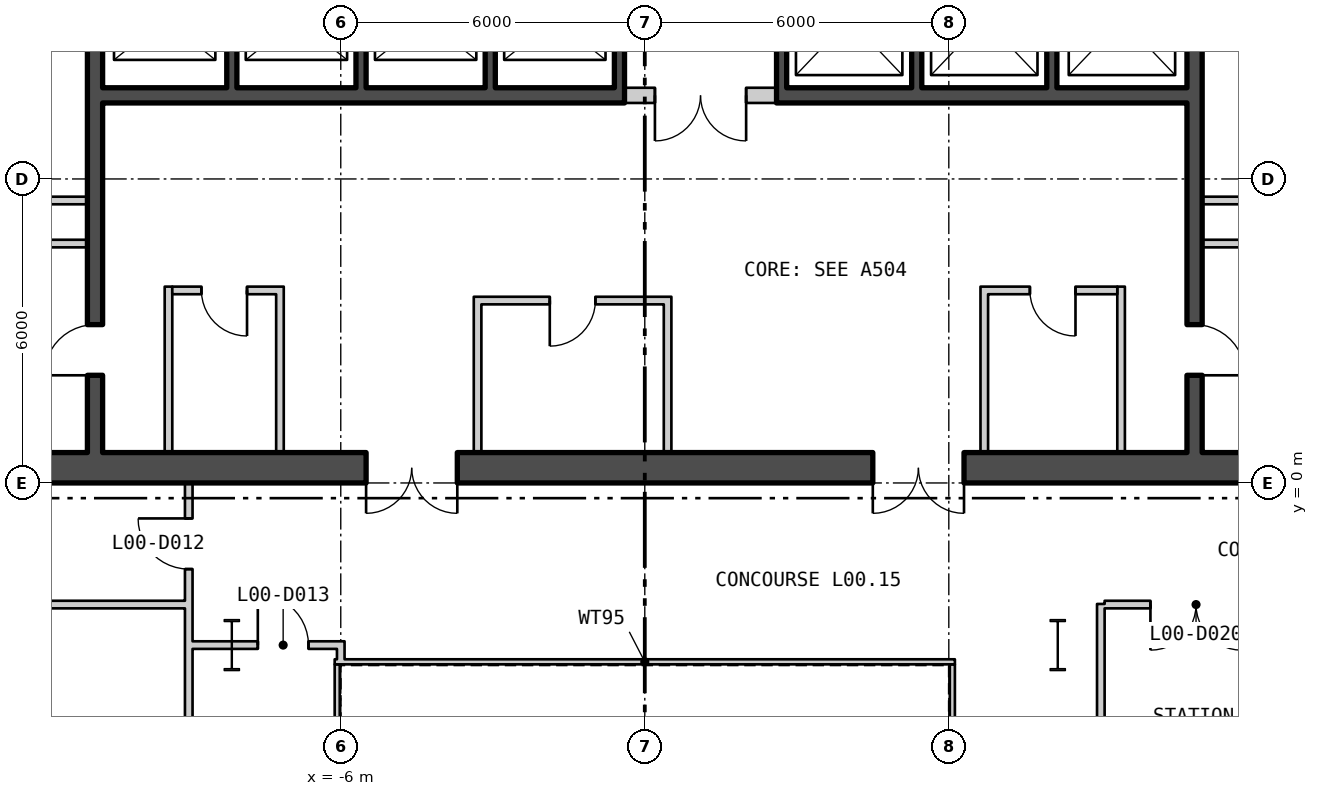
"""IFC4 building model, lengths in metres.
Left out: names, types, materials, properties, quantities, classifications, styles, units other than length and angle.
Written with IfcOpenShell. Run it as: python <this file> out.ifc"""

import sys

from ifc_helpers import new_model, si_unit, direction, frame, frame_2d, origin, origin_2d, place, context, subcontext, project, spatial, rectangle, i_section, extrude, element, fill, save


model = new_model("IFC4")
c1 = context("Model", 3, precision=1e-05, world=origin(), true_north=direction((0.0, 1.0)))
c2 = subcontext(c1, "Body", "Model", "MODEL_VIEW")
j1 = project(units=[si_unit("LENGTHUNIT", "METRE"), si_unit("PLANEANGLEUNIT", "RADIAN")], contexts=[c1])
p1 = place(None, origin())
s1 = spatial("IfcSite", under=j1, at=p1, CompositionType="ELEMENT")
p2 = place(p1, origin())
s2 = spatial("IfcBuilding", under=s1, at=p2, CompositionType="ELEMENT")
p3 = place(p2, origin())
s3 = spatial("IfcBuildingStorey", under=s2, at=p3, CompositionType="ELEMENT", Elevation=0.0)
for number, where, z_axis, x_axis in (
    (1, (8.15, -3.2, 0.0), (0.0, 0.0, 1.0), (1.0, 0.0, 0.0)),
    (2, (-8.15, -3.2, 0.0), (0.0, 0.0, 1.0), (1.0, 0.0, 0.0)),
):
    element("IfcColumn", number, at=place(p3, frame(where, z_axis=z_axis, x_axis=x_axis)), inside=s3, PredefinedType="COLUMN", context=c2, shape_type="SweptSolid", body=[
        extrude(i_section(OverallWidth=0.302, OverallDepth=1.008, WebThickness=0.021, FlangeThickness=0.04, at=origin_2d()), origin(), (0.0, 0.0, 1.0), 8.4),
    ])
p4 = place(p3, frame((6.07, -11.62, 0.0), z_axis=(0.0, 0.0, 1.0), x_axis=(0.0, 1.0, 0.0)))
e3 = element("IfcWall", 3, at=p4, inside=s3, PredefinedType="PARTITIONING", context=c2, shape_type="SweptSolid", body=[
    extrude(rectangle(XDim=8.04, YDim=0.1, at=frame_2d((4.02, 0.0))), origin(), (0.0, 0.0, 1.0), 8.18),
])
p5 = place(p3, frame((6.12, -3.53, 0.0), z_axis=(0.0, 0.0, 1.0), x_axis=(-1.0, 0.0, 0.0)))
e4 = element("IfcWall", 4, at=p5, inside=s3, PredefinedType="PARTITIONING", context=c2, shape_type="SweptSolid", body=[
    extrude(rectangle(XDim=12.24, YDim=0.1, at=frame_2d((6.12, 0.0))), origin(), (0.0, 0.0, 1.0), 8.18),
])
p6 = place(p3, frame((-6.07, -3.58, 0.0), z_axis=(0.0, 0.0, 1.0), x_axis=(0.0, -1.0, 0.0)))
e5 = element("IfcWall", 5, at=p6, inside=s3, PredefinedType="PARTITIONING", context=c2, shape_type="SweptSolid", body=[
    extrude(rectangle(XDim=8.04, YDim=0.1, at=frame_2d((4.02, 0.0))), origin(), (0.0, 0.0, 1.0), 8.18),
])
p7 = place(p3, frame((-17.5, 0.3, 0.0), z_axis=(0.0, 0.0, 1.0), x_axis=(1.0, 0.0, 0.0)))
e6 = element("IfcWall", 6, at=p7, inside=s3, PredefinedType="SHEAR", context=c2, shape_type="SweptSolid", body=[
    extrude(rectangle(XDim=35.0, YDim=0.6, at=frame_2d((17.5, 0.0))), origin(), (0.0, 0.0, 1.0), 8.18),
])
p8 = place(p7, frame((12.0, 0.0, 0.0)))
e7 = element("IfcOpeningElement", 7, at=p8, cuts=e6, PredefinedType="OPENING", context=c2, shape_type="SweptSolid", body=[
    extrude(rectangle(XDim=1.8, YDim=2.4, at=frame_2d((0.9, 1.2))), frame((0.0, 0.31, 0.0), z_axis=(0.0, -1.0, 0.0), x_axis=(1.0, 0.0, 0.0)), (0.0, 0.0, 1.0), 0.62),
])
p9 = place(p7, frame((22.0, 0.0, 0.0)))
e8 = element("IfcOpeningElement", 8, at=p9, cuts=e6, PredefinedType="OPENING", context=c2, shape_type="SweptSolid", body=[
    extrude(rectangle(XDim=1.8, YDim=2.4, at=frame_2d((0.9, 1.2))), frame((0.0, 0.31, 0.0), z_axis=(0.0, -1.0, 0.0), x_axis=(1.0, 0.0, 0.0)), (0.0, 0.0, 1.0), 0.62),
])
p10 = place(p3, frame((-10.85, 0.6, 0.0), z_axis=(0.0, 0.0, 1.0), x_axis=(0.0, 1.0, 0.0)))
e9 = element("IfcWall", 9, at=p10, inside=s3, PredefinedType="SHEAR", context=c2, shape_type="SweptSolid", body=[
    extrude(rectangle(XDim=16.8, YDim=0.3, at=frame_2d((8.4, 0.0))), origin(), (0.0, 0.0, 1.0), 8.18),
])
p11 = place(p10, frame((1.525, 0.0, 0.0)))
e10 = element("IfcOpeningElement", 10, at=p11, cuts=e9, PredefinedType="OPENING", context=c2, shape_type="SweptSolid", body=[
    extrude(rectangle(XDim=1.0, YDim=2.1, at=frame_2d((0.5, 1.05))), frame((0.0, 0.16, 0.0), z_axis=(0.0, -1.0, 0.0), x_axis=(1.0, 0.0, 0.0)), (0.0, 0.0, 1.0), 0.32),
])
p12 = place(p3, frame((10.85, 0.6, 0.0), z_axis=(0.0, 0.0, 1.0), x_axis=(0.0, 1.0, 0.0)))
e11 = element("IfcWall", 11, at=p12, inside=s3, PredefinedType="SHEAR", context=c2, shape_type="SweptSolid", body=[
    extrude(rectangle(XDim=16.8, YDim=0.3, at=frame_2d((8.4, 0.0))), origin(), (0.0, 0.0, 1.0), 8.18),
])
p13 = place(p12, frame((1.525, 0.0, 0.0)))
e12 = element("IfcOpeningElement", 12, at=p13, cuts=e11, PredefinedType="OPENING", context=c2, shape_type="SweptSolid", body=[
    extrude(rectangle(XDim=1.0, YDim=2.1, at=frame_2d((0.5, 1.05))), frame((0.0, 0.16, 0.0), z_axis=(0.0, -1.0, 0.0), x_axis=(1.0, 0.0, 0.0)), (0.0, 0.0, 1.0), 0.32),
])
p14 = place(p3, frame((-10.7, 7.65, 0.0), z_axis=(0.0, 0.0, 1.0), x_axis=(1.0, 0.0, 0.0)))
e13 = element("IfcWall", 13, at=p14, inside=s3, PredefinedType="SHEAR", context=c2, shape_type="SweptSolid", body=[
    extrude(rectangle(XDim=10.3, YDim=0.3, at=frame_2d((5.15, 0.0))), origin(), (0.0, 0.0, 1.0), 8.18),
])
p15 = place(p3, frame((2.6, 7.65, 0.0), z_axis=(0.0, 0.0, 1.0), x_axis=(1.0, 0.0, 0.0)))
e14 = element("IfcWall", 14, at=p15, inside=s3, PredefinedType="SHEAR", context=c2, shape_type="SweptSolid", body=[
    extrude(rectangle(XDim=8.1, YDim=0.3, at=frame_2d((4.05, 0.0))), origin(), (0.0, 0.0, 1.0), 8.18),
])
for number, where, z_axis, x_axis in (
    (15, (-8.15, 7.8, 0.0), (0.0, 0.0, 1.0), (0.0, 1.0, 0.0)),
    (16, (-5.6, 7.8, 0.0), (0.0, 0.0, 1.0), (0.0, 1.0, 0.0)),
    (17, (-3.05, 7.8, 0.0), (0.0, 0.0, 1.0), (0.0, 1.0, 0.0)),
    (18, (-0.5, 7.8, 0.0), (0.0, 0.0, 1.0), (0.0, 1.0, 0.0)),
    (19, (2.7, 7.8, 0.0), (0.0, 0.0, 1.0), (0.0, 1.0, 0.0)),
    (20, (5.367, 7.8, 0.0), (0.0, 0.0, 1.0), (0.0, 1.0, 0.0)),
    (21, (8.033, 7.8, 0.0), (0.0, 0.0, 1.0), (0.0, 1.0, 0.0)),
):
    element("IfcWall", number, at=place(p3, frame(where, z_axis=z_axis, x_axis=x_axis)), inside=s3, PredefinedType="SHEAR", context=c2, shape_type="SweptSolid", body=[
        extrude(rectangle(XDim=2.7, YDim=0.2, at=frame_2d((1.35, 0.0))), origin(), (0.0, 0.0, 1.0), 8.18),
    ])
for number, where, z_axis, x_axis in (
    (22, (-14.2, 5.575, 0.0), (0.0, 0.0, 1.0), (1.0, 0.0, 0.0)),
    (23, (-14.2, 4.725, 0.0), (0.0, 0.0, 1.0), (1.0, 0.0, 0.0)),
    (24, (11.0, 5.575, 0.0), (0.0, 0.0, 1.0), (1.0, 0.0, 0.0)),
    (25, (11.0, 4.725, 0.0), (0.0, 0.0, 1.0), (1.0, 0.0, 0.0)),
):
    element("IfcWall", number, at=place(p3, frame(where, z_axis=z_axis, x_axis=x_axis)), inside=s3, PredefinedType="PARTITIONING", context=c2, shape_type="SweptSolid", body=[
        extrude(rectangle(XDim=3.2, YDim=0.15, at=frame_2d((1.6, 0.0))), origin(), (0.0, 0.0, 1.0), 8.18),
    ])
for number, where, z_axis, x_axis in (
    (26, (-9.4, 0.6, 0.0), (0.0, 0.0, 1.0), (0.0, 1.0, 0.0)),
    (27, (-7.2, 0.6, 0.0), (0.0, 0.0, 1.0), (0.0, 1.0, 0.0)),
):
    element("IfcWall", number, at=place(p3, frame(where, z_axis=z_axis, x_axis=x_axis)), inside=s3, PredefinedType="PARTITIONING", context=c2, shape_type="SweptSolid", body=[
        extrude(rectangle(XDim=3.275, YDim=0.15, at=frame_2d((1.637, 0.0))), origin(), (0.0, 0.0, 1.0), 8.18),
    ])
p16 = place(p3, frame((-9.325, 3.8, 0.0), z_axis=(0.0, 0.0, 1.0), x_axis=(1.0, 0.0, 0.0)))
e28 = element("IfcWall", 28, at=p16, inside=s3, PredefinedType="PARTITIONING", context=c2, shape_type="SweptSolid", body=[
    extrude(rectangle(XDim=2.05, YDim=0.15, at=frame_2d((1.025, 0.0))), origin(), (0.0, 0.0, 1.0), 8.18),
])
p17 = place(p16, frame((0.575, 0.0, 0.0)))
e29 = element("IfcOpeningElement", 29, at=p17, cuts=e28, PredefinedType="OPENING", context=c2, shape_type="SweptSolid", body=[
    extrude(rectangle(XDim=0.9, YDim=2.1, at=frame_2d((0.45, 1.05))), frame((0.0, 0.085, 0.0), z_axis=(0.0, -1.0, 0.0), x_axis=(1.0, 0.0, 0.0)), (0.0, 0.0, 1.0), 0.17),
])
for number, where, z_axis, x_axis in (
    (30, (-3.3, 0.6, 0.0), (0.0, 0.0, 1.0), (0.0, 1.0, 0.0)),
    (31, (0.45, 0.6, 0.0), (0.0, 0.0, 1.0), (0.0, 1.0, 0.0)),
):
    element("IfcWall", number, at=place(p3, frame(where, z_axis=z_axis, x_axis=x_axis)), inside=s3, PredefinedType="PARTITIONING", context=c2, shape_type="SweptSolid", body=[
        extrude(rectangle(XDim=3.075, YDim=0.15, at=frame_2d((1.538, 0.0))), origin(), (0.0, 0.0, 1.0), 8.18),
    ])
p18 = place(p3, frame((-3.225, 3.6, 0.0), z_axis=(0.0, 0.0, 1.0), x_axis=(1.0, 0.0, 0.0)))
e32 = element("IfcWall", 32, at=p18, inside=s3, PredefinedType="PARTITIONING", context=c2, shape_type="SweptSolid", body=[
    extrude(rectangle(XDim=3.6, YDim=0.15, at=frame_2d((1.8, 0.0))), origin(), (0.0, 0.0, 1.0), 8.18),
])
p19 = place(p18, frame((1.35, 0.0, 0.0)))
e33 = element("IfcOpeningElement", 33, at=p19, cuts=e32, PredefinedType="OPENING", context=c2, shape_type="SweptSolid", body=[
    extrude(rectangle(XDim=0.9, YDim=2.1, at=frame_2d((0.45, 1.05))), frame((0.0, 0.085, 0.0), z_axis=(0.0, -1.0, 0.0), x_axis=(1.0, 0.0, 0.0)), (0.0, 0.0, 1.0), 0.17),
])
for number, where, z_axis, x_axis in (
    (34, (6.7, 0.6, 0.0), (0.0, 0.0, 1.0), (0.0, 1.0, 0.0)),
    (35, (9.4, 0.6, 0.0), (0.0, 0.0, 1.0), (0.0, 1.0, 0.0)),
):
    element("IfcWall", number, at=place(p3, frame(where, z_axis=z_axis, x_axis=x_axis)), inside=s3, PredefinedType="PARTITIONING", context=c2, shape_type="SweptSolid", body=[
        extrude(rectangle(XDim=3.275, YDim=0.15, at=frame_2d((1.637, 0.0))), origin(), (0.0, 0.0, 1.0), 8.18),
    ])
p20 = place(p3, frame((6.775, 3.8, 0.0), z_axis=(0.0, 0.0, 1.0), x_axis=(1.0, 0.0, 0.0)))
e36 = element("IfcWall", 36, at=p20, inside=s3, PredefinedType="PARTITIONING", context=c2, shape_type="SweptSolid", body=[
    extrude(rectangle(XDim=2.55, YDim=0.15, at=frame_2d((1.275, 0.0))), origin(), (0.0, 0.0, 1.0), 8.18),
])
p21 = place(p20, frame((0.825, 0.0, 0.0)))
e37 = element("IfcOpeningElement", 37, at=p21, cuts=e36, PredefinedType="OPENING", context=c2, shape_type="SweptSolid", body=[
    extrude(rectangle(XDim=0.9, YDim=2.1, at=frame_2d((0.45, 1.05))), frame((0.0, 0.085, 0.0), z_axis=(0.0, -1.0, 0.0), x_axis=(1.0, 0.0, 0.0)), (0.0, 0.0, 1.0), 0.17),
])
p22 = place(p3, frame((-0.4, 7.65, 0.0), z_axis=(0.0, 0.0, 1.0), x_axis=(1.0, 0.0, 0.0)))
e38 = element("IfcWall", 38, at=p22, inside=s3, PredefinedType="PARTITIONING", context=c2, shape_type="SweptSolid", body=[
    extrude(rectangle(XDim=3.0, YDim=0.3, at=frame_2d((1.5, 0.0))), origin(), (0.0, 0.0, 1.0), 8.18),
])
p23 = place(p22, frame((0.6, 0.0, 0.0)))
e39 = element("IfcOpeningElement", 39, at=p23, cuts=e38, PredefinedType="OPENING", context=c2, shape_type="SweptSolid", body=[
    extrude(rectangle(XDim=1.8, YDim=2.4, at=frame_2d((0.9, 1.2))), frame((0.0, 0.16, 0.0), z_axis=(0.0, -1.0, 0.0), x_axis=(1.0, 0.0, 0.0)), (0.0, 0.0, 1.0), 0.32),
])
p24 = place(p3, frame((-17.425, -2.4, 0.0), z_axis=(0.0, 0.0, 1.0), x_axis=(1.0, 0.0, 0.0)))
e40 = element("IfcWall", 40, at=p24, inside=s3, PredefinedType="PARTITIONING", context=c2, shape_type="SweptSolid", body=[
    extrude(rectangle(XDim=8.35, YDim=0.15, at=frame_2d((4.175, 0.0))), origin(), (0.0, 0.0, 1.0), 8.18),
])
p25 = place(p3, frame((-9.0, -13.675, 0.0), z_axis=(0.0, 0.0, 1.0), x_axis=(0.0, 1.0, 0.0)))
e41 = element("IfcWall", 41, at=p25, inside=s3, PredefinedType="PARTITIONING", context=c2, shape_type="SweptSolid", body=[
    extrude(rectangle(XDim=13.675, YDim=0.15, at=frame_2d((6.838, 0.0))), origin(), (0.0, 0.0, 1.0), 8.18),
])
p26 = place(p25, frame((11.975, 0.0, 0.0)))
e42 = element("IfcOpeningElement", 42, at=p26, cuts=e41, PredefinedType="OPENING", context=c2, shape_type="SweptSolid", body=[
    extrude(rectangle(XDim=1.0, YDim=2.1, at=frame_2d((0.5, 1.05))), frame((0.0, 0.085, 0.0), z_axis=(0.0, -1.0, 0.0), x_axis=(1.0, 0.0, 0.0)), (0.0, 0.0, 1.0), 0.17),
])
p27 = place(p3, frame((-8.925, -3.2, 0.0), z_axis=(0.0, 0.0, 1.0), x_axis=(1.0, 0.0, 0.0)))
e43 = element("IfcWall", 43, at=p27, inside=s3, PredefinedType="PARTITIONING", context=c2, shape_type="SweptSolid", body=[
    extrude(rectangle(XDim=0.775, YDim=0.15, at=frame_2d((0.388, 0.0))), origin(), (0.0, 0.0, 1.0), 7.39),
])
p28 = place(p3, frame((-8.15, -3.2, 0.0), z_axis=(0.0, 0.0, 1.0), x_axis=(1.0, 0.0, 0.0)))
e44 = element("IfcWall", 44, at=p28, inside=s3, PredefinedType="PARTITIONING", context=c2, shape_type="SweptSolid", body=[
    extrude(rectangle(XDim=2.225, YDim=0.15, at=frame_2d((1.113, 0.0))), origin(), (0.0, 0.0, 1.0), 7.27),
])
p29 = place(p28, frame((0.513, 0.0, 0.0)))
e45 = element("IfcOpeningElement", 45, at=p29, cuts=e44, PredefinedType="OPENING", context=c2, shape_type="SweptSolid", body=[
    extrude(rectangle(XDim=1.0, YDim=2.1, at=frame_2d((0.5, 1.05))), frame((0.0, 0.085, 0.0), z_axis=(0.0, -1.0, 0.0), x_axis=(1.0, 0.0, 0.0)), (0.0, 0.0, 1.0), 0.17),
])
p30 = place(p3, frame((-6.0, -3.48, 0.0), z_axis=(0.0, 0.0, 1.0), x_axis=(0.0, 1.0, 0.0)))
e46 = element("IfcWall", 46, at=p30, inside=s3, PredefinedType="PARTITIONING", context=c2, shape_type="SweptSolid", body=[
    extrude(rectangle(XDim=0.205, YDim=0.15, at=frame_2d((0.102, 0.0))), origin(), (0.0, 0.0, 1.0), 8.18),
])
p31 = place(p3, frame((9.0, -13.675, 0.0), z_axis=(0.0, 0.0, 1.0), x_axis=(0.0, 1.0, 0.0)))
e47 = element("IfcWall", 47, at=p31, inside=s3, PredefinedType="PARTITIONING", context=c2, shape_type="SweptSolid", body=[
    extrude(rectangle(XDim=11.287, YDim=0.15, at=frame_2d((5.644, 0.0))), origin(), (0.0, 0.0, 1.0), 8.18),
])
p32 = place(p31, frame((2.848, 0.0, 0.0)))
e48 = element("IfcOpeningElement", 48, at=p32, cuts=e47, PredefinedType="OPENING", context=c2, shape_type="SweptSolid", body=[
    extrude(rectangle(XDim=1.0, YDim=2.1, at=frame_2d((0.5, 1.05))), frame((0.0, 0.085, 0.0), z_axis=(0.0, -1.0, 0.0), x_axis=(1.0, 0.0, 0.0)), (0.0, 0.0, 1.0), 0.17),
])
p33 = place(p3, frame((9.075, -2.4, 0.0), z_axis=(0.0, 0.0, 1.0), x_axis=(1.0, 0.0, 0.0)))
e49 = element("IfcWall", 49, at=p33, inside=s3, PredefinedType="PARTITIONING", context=c2, shape_type="SweptSolid", body=[
    extrude(rectangle(XDim=7.95, YDim=0.15, at=frame_2d((3.975, 0.0))), origin(), (0.0, 0.0, 1.0), 8.18),
])
p34 = place(p33, frame((0.904, 0.0, 0.0)))
e50 = element("IfcOpeningElement", 50, at=p34, cuts=e49, PredefinedType="OPENING", context=c2, shape_type="SweptSolid", body=[
    extrude(rectangle(XDim=1.8, YDim=2.1, at=frame_2d((0.9, 1.05))), frame((0.0, 0.085, 0.0), z_axis=(0.0, -1.0, 0.0), x_axis=(1.0, 0.0, 0.0)), (0.0, 0.0, 1.0), 0.17),
])
p35 = place(p33, frame((5.279, 0.0, 0.0)))
e51 = element("IfcOpeningElement", 51, at=p35, cuts=e49, PredefinedType="OPENING", context=c2, shape_type="SweptSolid", body=[
    extrude(rectangle(XDim=1.0, YDim=2.1, at=frame_2d((0.5, 1.05))), frame((0.0, 0.085, 0.0), z_axis=(0.0, -1.0, 0.0), x_axis=(1.0, 0.0, 0.0)), (0.0, 0.0, 1.0), 0.17),
])
p36 = place(p11, origin())
e52 = element("IfcDoor", 52, at=p36, inside=s3, OperationType="SINGLE_SWING_RIGHT", PredefinedType="DOOR", context=c2, shape_type="SweptSolid", body=[
    extrude(rectangle(XDim=1.0, YDim=2.1, at=frame_2d((0.5, 1.05))), frame((0.0, 0.025, 0.0), z_axis=(0.0, -1.0, 0.0), x_axis=(1.0, 0.0, 0.0)), (0.0, 0.0, 1.0), 0.05),
])
fill(e10, e52)
p37 = place(p13, origin())
e53 = element("IfcDoor", 53, at=p37, inside=s3, OperationType="SINGLE_SWING_LEFT", PredefinedType="DOOR", context=c2, shape_type="SweptSolid", body=[
    extrude(rectangle(XDim=1.0, YDim=2.1, at=frame_2d((0.5, 1.05))), frame((0.0, 0.025, 0.0), z_axis=(0.0, -1.0, 0.0), x_axis=(1.0, 0.0, 0.0)), (0.0, 0.0, 1.0), 0.05),
])
fill(e12, e53)
p38 = place(p17, origin())
e54 = element("IfcDoor", 54, at=p38, inside=s3, OperationType="SINGLE_SWING_RIGHT", PredefinedType="DOOR", context=c2, shape_type="SweptSolid", body=[
    extrude(rectangle(XDim=0.9, YDim=2.1, at=frame_2d((0.45, 1.05))), frame((0.0, 0.025, 0.0), z_axis=(0.0, -1.0, 0.0), x_axis=(1.0, 0.0, 0.0)), (0.0, 0.0, 1.0), 0.05),
])
fill(e29, e54)
p39 = place(p19, origin())
e55 = element("IfcDoor", 55, at=p39, inside=s3, OperationType="SINGLE_SWING_LEFT", PredefinedType="DOOR", context=c2, shape_type="SweptSolid", body=[
    extrude(rectangle(XDim=0.9, YDim=2.1, at=frame_2d((0.45, 1.05))), frame((0.0, 0.025, 0.0), z_axis=(0.0, -1.0, 0.0), x_axis=(1.0, 0.0, 0.0)), (0.0, 0.0, 1.0), 0.05),
])
fill(e33, e55)
p40 = place(p21, origin())
e56 = element("IfcDoor", 56, at=p40, inside=s3, OperationType="SINGLE_SWING_RIGHT", PredefinedType="DOOR", context=c2, shape_type="SweptSolid", body=[
    extrude(rectangle(XDim=0.9, YDim=2.1, at=frame_2d((0.45, 1.05))), frame((0.0, 0.025, 0.0), z_axis=(0.0, -1.0, 0.0), x_axis=(1.0, 0.0, 0.0)), (0.0, 0.0, 1.0), 0.05),
])
fill(e37, e56)
p41 = place(p23, origin())
e57 = element("IfcDoor", 57, at=p41, inside=s3, OperationType="DOUBLE_DOOR_SINGLE_SWING", PredefinedType="DOOR", context=c2, shape_type="SweptSolid", body=[
    extrude(rectangle(XDim=1.8, YDim=2.4, at=frame_2d((0.9, 1.2))), frame((0.0, 0.025, 0.0), z_axis=(0.0, -1.0, 0.0), x_axis=(1.0, 0.0, 0.0)), (0.0, 0.0, 1.0), 0.05),
])
fill(e39, e57)
p42 = place(p8, origin())
e58 = element("IfcDoor", 58, at=p42, inside=s3, OperationType="DOUBLE_DOOR_SINGLE_SWING", PredefinedType="DOOR", context=c2, shape_type="SweptSolid", body=[
    extrude(rectangle(XDim=1.8, YDim=2.4, at=frame_2d((0.9, 1.2))), frame((0.0, 0.025, 0.0), z_axis=(0.0, -1.0, 0.0), x_axis=(1.0, 0.0, 0.0)), (0.0, 0.0, 1.0), 0.05),
])
fill(e7, e58)
p43 = place(p9, origin())
e59 = element("IfcDoor", 59, at=p43, inside=s3, OperationType="DOUBLE_DOOR_SINGLE_SWING", PredefinedType="DOOR", context=c2, shape_type="SweptSolid", body=[
    extrude(rectangle(XDim=1.8, YDim=2.4, at=frame_2d((0.9, 1.2))), frame((0.0, 0.025, 0.0), z_axis=(0.0, -1.0, 0.0), x_axis=(1.0, 0.0, 0.0)), (0.0, 0.0, 1.0), 0.05),
])
fill(e8, e59)
p44 = place(p26, origin())
e60 = element("IfcDoor", 60, at=p44, inside=s3, OperationType="SINGLE_SWING_LEFT", PredefinedType="DOOR", context=c2, shape_type="SweptSolid", body=[
    extrude(rectangle(XDim=1.0, YDim=2.1, at=frame_2d((0.5, 1.05))), frame((0.0, 0.025, 0.0), z_axis=(0.0, -1.0, 0.0), x_axis=(1.0, 0.0, 0.0)), (0.0, 0.0, 1.0), 0.05),
])
fill(e42, e60)
p45 = place(p29, origin())
e61 = element("IfcDoor", 61, at=p45, inside=s3, OperationType="SINGLE_SWING_RIGHT", PredefinedType="DOOR", context=c2, shape_type="SweptSolid", body=[
    extrude(rectangle(XDim=1.0, YDim=2.1, at=frame_2d((0.5, 1.05))), frame((0.0, 0.025, 0.0), z_axis=(0.0, -1.0, 0.0), x_axis=(1.0, 0.0, 0.0)), (0.0, 0.0, 1.0), 0.05),
])
fill(e45, e61)
p46 = place(p34, origin())
e62 = element("IfcDoor", 62, at=p46, inside=s3, OperationType="DOUBLE_DOOR_SINGLE_SWING", PredefinedType="DOOR", context=c2, shape_type="SweptSolid", body=[
    extrude(rectangle(XDim=1.8, YDim=2.1, at=frame_2d((0.9, 1.05))), frame((0.0, 0.025, 0.0), z_axis=(0.0, -1.0, 0.0), x_axis=(1.0, 0.0, 0.0)), (0.0, 0.0, 1.0), 0.05),
])
fill(e50, e62)
save(model, sys.argv[1])
